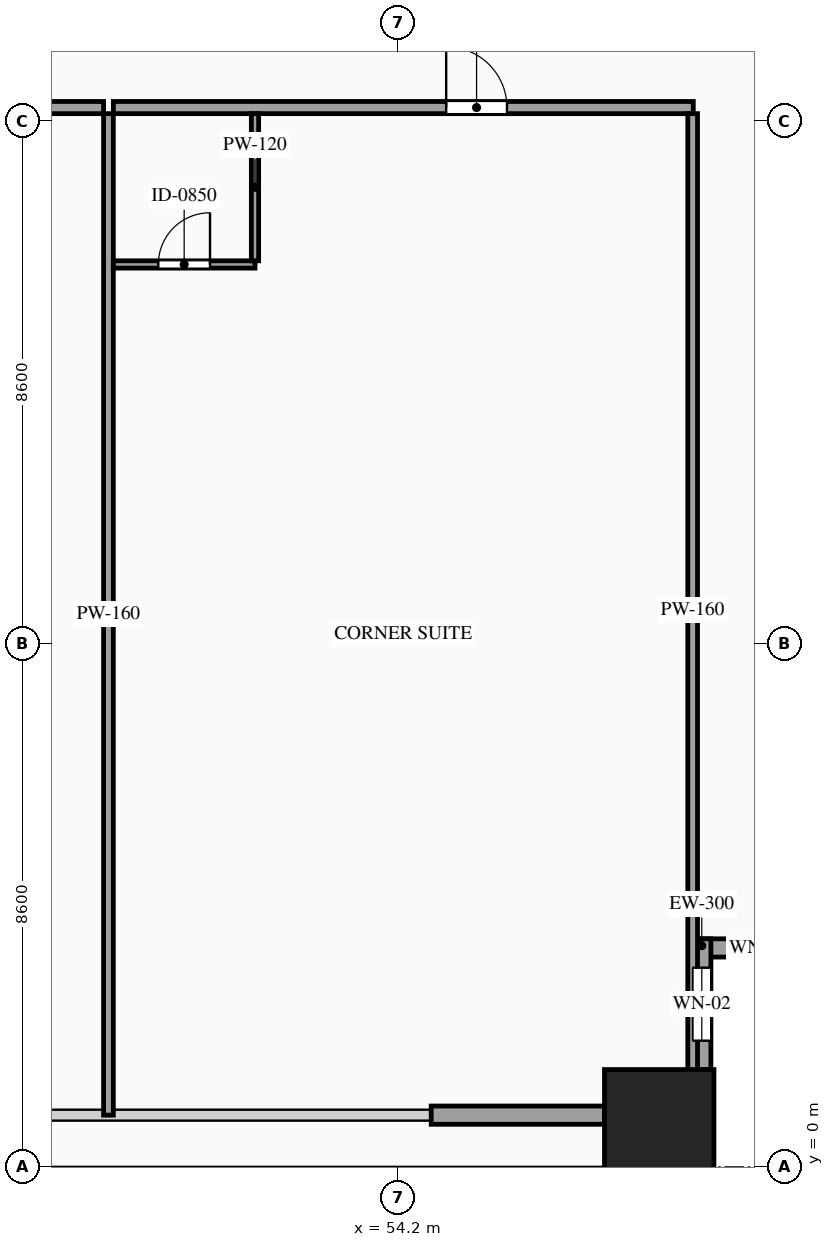
"""IFC4 building model, lengths in metres.
Left out: names, types, materials, properties, quantities, classifications, styles, units other than length and angle.
Written with IfcOpenShell. Run it as: python <this file> out.ifc"""

import sys

from ifc_helpers import new_model, si_unit, direction, frame, frame_2d, origin, origin_2d, place, context, subcontext, project, spatial, rectangle, hollow_rectangle, extrude, source, transform, mapped, element, fill, save


model = new_model("IFC4")
c1 = context("Model", 3, precision=1e-05, world=origin(), true_north=direction((0.0, 1.0)))
c2 = subcontext(c1, "Body", "Model", "MODEL_VIEW")
j1 = project(units=[si_unit("LENGTHUNIT", "METRE"), si_unit("PLANEANGLEUNIT", "RADIAN")], contexts=[c1])
p1 = place(None, origin())
s1 = spatial("IfcSite", under=j1, at=p1, CompositionType="ELEMENT")
p2 = place(p1, origin())
s2 = spatial("IfcBuilding", under=s1, at=p2, CompositionType="ELEMENT")
p3 = place(p2, frame((0.0, 0.0, 49.6)))
s3 = spatial("IfcBuildingStorey", under=s2, at=p3, CompositionType="ELEMENT", Elevation=49.6)
m1 = source(origin(), c2, "Body", "SweptSolid", [
    extrude(hollow_rectangle(XDim=1.8, YDim=1.8, WallThickness=0.08, at=origin_2d()), origin(), (0.0, 0.0, 1.0), 3.6),
])
p4 = place(p3, frame((58.5, 0.7, 0.0), z_axis=(0.0, 0.0, 1.0), x_axis=(1.0, 0.0, 0.0)))
e1 = element("IfcColumn", 1, at=p4, inside=s3, PredefinedType="COLUMN", context=c2, shape_type="MappedRepresentation", body=[
    mapped(m1, transform((0.0, 0.0, 0.0), scale=1.0)),
])
p5 = place(p3, frame((59.05, 3.6, 0.0), z_axis=(0.0, 0.0, 1.0), x_axis=(1.0, 0.0, 0.0)))
e2 = element("IfcWall", 2, at=p5, inside=s3, PredefinedType="SOLIDWALL", context=c2, shape_type="SweptSolid", body=[
    extrude(rectangle(XDim=2.15, YDim=0.3, at=frame_2d((1.075, 0.0))), origin(), (0.0, 0.0, 1.0), 3.38),
])
p6 = place(p5, frame((0.625, 0.0, 0.85)))
e3 = element("IfcOpeningElement", 3, at=p6, cuts=e2, PredefinedType="OPENING", context=c2, shape_type="SweptSolid", body=[
    extrude(rectangle(XDim=0.9, YDim=1.5, at=frame_2d((0.45, 0.75))), frame((0.0, 0.165, 0.0), z_axis=(0.0, -1.0, 0.0), x_axis=(1.0, 0.0, 0.0)), (0.0, 0.0, 1.0), 0.33),
])
p7 = place(p3, frame((59.2, 1.6, 0.0), z_axis=(0.0, 0.0, 1.0), x_axis=(0.0, 1.0, 0.0)))
e4 = element("IfcWall", 4, at=p7, inside=s3, PredefinedType="SOLIDWALL", context=c2, shape_type="SweptSolid", body=[
    extrude(rectangle(XDim=2.15, YDim=0.3, at=frame_2d((1.075, 0.0))), origin(), (0.0, 0.0, 1.0), 3.38),
])
p8 = place(p7, frame((0.475, 0.0, 0.85)))
e5 = element("IfcOpeningElement", 5, at=p8, cuts=e4, PredefinedType="OPENING", context=c2, shape_type="SweptSolid", body=[
    extrude(rectangle(XDim=1.2, YDim=2.1, at=frame_2d((0.6, 1.05))), frame((0.0, 0.165, 0.0), z_axis=(0.0, -1.0, 0.0), x_axis=(1.0, 0.0, 0.0)), (0.0, 0.0, 1.0), 0.33),
])
m2 = source(origin(), c2, "Body", "SweptSolid", [
    extrude(rectangle(XDim=2.85, YDim=0.3, at=frame_2d((1.425, 0.0))), origin(), (0.0, 0.0, 1.0), 2.775),
])
p9 = place(p3, frame((54.75, 0.85, 0.0), z_axis=(0.0, 0.0, 1.0), x_axis=(1.0, 0.0, 0.0)))
e6 = element("IfcWall", 6, at=p9, inside=s3, PredefinedType="SOLIDWALL", context=c2, shape_type="MappedRepresentation", body=[
    mapped(m2, transform((0.0, 0.0, 0.0), scale=1.0)),
])
p10 = place(p3, frame((42.816, 17.42, 0.0), z_axis=(0.0, 0.0, 1.0), x_axis=(1.0, 0.0, 0.0)))
e7 = element("IfcWall", 7, at=p10, inside=s3, PredefinedType="PARTITIONING", context=c2, shape_type="SweptSolid", body=[
    extrude(rectangle(XDim=6.546, YDim=0.2, at=frame_2d((3.273, 0.0))), origin(), (0.0, 0.0, 1.0), 3.38),
])
p11 = place(p10, frame((2.773, 0.0, 0.0)))
e8 = element("IfcOpeningElement", 8, at=p11, cuts=e7, PredefinedType="OPENING", context=c2, shape_type="SweptSolid", body=[
    extrude(rectangle(XDim=1.0, YDim=2.2, at=frame_2d((0.5, 1.1))), frame((0.0, 0.115, 0.0), z_axis=(0.0, -1.0, 0.0), x_axis=(1.0, 0.0, 0.0)), (0.0, 0.0, 1.0), 0.23),
])
m3 = source(origin(), c2, "Body", "SweptSolid", [
    extrude(rectangle(XDim=16.47, YDim=0.16, at=frame_2d((8.235, 0.0))), origin(), (0.0, 0.0, 1.0), 3.38),
])
p12 = place(p3, frame((49.442, 0.85, 0.0), z_axis=(0.0, 0.0, 1.0), x_axis=(0.0, 1.0, 0.0)))
e9 = element("IfcWall", 9, at=p12, inside=s3, PredefinedType="PARTITIONING", context=c2, shape_type="MappedRepresentation", body=[
    mapped(m3, transform((0.0, 0.0, 0.0), scale=1.0)),
])
p13 = place(p3, frame((49.522, 17.42, 0.0), z_axis=(0.0, 0.0, 1.0), x_axis=(1.0, 0.0, 0.0)))
e10 = element("IfcWall", 10, at=p13, inside=s3, PredefinedType="PARTITIONING", context=c2, shape_type="SweptSolid", body=[
    extrude(rectangle(XDim=9.538, YDim=0.2, at=frame_2d((4.769, 0.0))), origin(), (0.0, 0.0, 1.0), 3.38),
])
p14 = place(p13, frame((5.474, 0.0, 0.0)))
e11 = element("IfcOpeningElement", 11, at=p14, cuts=e10, PredefinedType="OPENING", context=c2, shape_type="SweptSolid", body=[
    extrude(rectangle(XDim=1.0, YDim=2.2, at=frame_2d((0.5, 1.1))), frame((0.0, 0.115, 0.0), z_axis=(0.0, -1.0, 0.0), x_axis=(1.0, 0.0, 0.0)), (0.0, 0.0, 1.0), 0.23),
])
m4 = source(origin(), c2, "Body", "SweptSolid", [
    extrude(rectangle(XDim=16.32, YDim=0.16, at=frame_2d((8.16, 0.0))), origin(), (0.0, 0.0, 1.0), 3.38),
])
p15 = place(p3, frame((59.05, 1.0, 0.0), z_axis=(0.0, 0.0, 1.0), x_axis=(0.0, 1.0, 0.0)))
e12 = element("IfcWall", 12, at=p15, inside=s3, PredefinedType="PARTITIONING", context=c2, shape_type="MappedRepresentation", body=[
    mapped(m4, transform((0.0, 0.0, 0.0), scale=1.0)),
])
p16 = place(p3, frame((49.522, 14.84, 0.0), z_axis=(0.0, 0.0, 1.0), x_axis=(1.0, 0.0, 0.0)))
e13 = element("IfcWall", 13, at=p16, inside=s3, PredefinedType="PARTITIONING", context=c2, shape_type="SweptSolid", body=[
    extrude(rectangle(XDim=2.33, YDim=0.12, at=frame_2d((1.165, 0.0))), origin(), (0.0, 0.0, 1.0), 3.38),
])
p17 = place(p16, frame((0.74, 0.0, 0.0)))
e14 = element("IfcOpeningElement", 14, at=p17, cuts=e13, PredefinedType="OPENING", context=c2, shape_type="SweptSolid", body=[
    extrude(rectangle(XDim=0.85, YDim=2.1, at=frame_2d((0.425, 1.05))), frame((0.0, 0.075, 0.0), z_axis=(0.0, -1.0, 0.0), x_axis=(1.0, 0.0, 0.0)), (0.0, 0.0, 1.0), 0.15),
])
m5 = source(origin(), c2, "Body", "SweptSolid", [
    extrude(rectangle(XDim=2.42, YDim=0.12, at=frame_2d((1.21, 0.0))), origin(), (0.0, 0.0, 1.0), 3.38),
])
p18 = place(p3, frame((51.852, 14.9, 0.0), z_axis=(0.0, 0.0, 1.0), x_axis=(0.0, 1.0, 0.0)))
e15 = element("IfcWall", 15, at=p18, inside=s3, PredefinedType="PARTITIONING", context=c2, shape_type="MappedRepresentation", body=[
    mapped(m5, transform((0.0, 0.0, 0.0), scale=1.0)),
])
m6 = source(origin(), c2, "Body", "SweptSolid", [
    extrude(rectangle(XDim=0.9, YDim=1.5, at=frame_2d((0.45, 0.75))), frame((0.0, 0.03, 0.0), z_axis=(0.0, -1.0, 0.0), x_axis=(1.0, 0.0, 0.0)), (0.0, 0.0, 1.0), 0.06),
])
p19 = place(p6, origin())
e16 = element("IfcWindow", 16, at=p19, inside=s3, PartitioningType="SINGLE_PANEL", PredefinedType="WINDOW", context=c2, shape_type="MappedRepresentation", body=[
    mapped(m6, transform((0.0, 0.0, 0.0), scale=1.0)),
])
fill(e3, e16)
m7 = source(origin(), c2, "Body", "SweptSolid", [
    extrude(rectangle(XDim=1.2, YDim=2.1, at=frame_2d((0.6, 1.05))), frame((0.0, 0.03, 0.0), z_axis=(0.0, -1.0, 0.0), x_axis=(1.0, 0.0, 0.0)), (0.0, 0.0, 1.0), 0.06),
])
p20 = place(p8, origin())
e17 = element("IfcWindow", 17, at=p20, inside=s3, PartitioningType="SINGLE_PANEL", PredefinedType="WINDOW", context=c2, shape_type="MappedRepresentation", body=[
    mapped(m7, transform((0.0, 0.0, 0.0), scale=1.0)),
])
fill(e5, e17)
m8 = source(origin(), c2, "Body", "SweptSolid", [
    extrude(rectangle(XDim=1.0, YDim=2.2, at=frame_2d((0.5, 1.1))), frame((0.0, 0.025, 0.0), z_axis=(0.0, -1.0, 0.0), x_axis=(1.0, 0.0, 0.0)), (0.0, 0.0, 1.0), 0.05),
])
p21 = place(p14, origin())
e18 = element("IfcDoor", 18, at=p21, inside=s3, OperationType="SINGLE_SWING_LEFT", PredefinedType="DOOR", context=c2, shape_type="MappedRepresentation", body=[
    mapped(m8, transform((0.0, 0.0, 0.0), scale=1.0)),
])
fill(e11, e18)
m9 = source(origin(), c2, "Body", "SweptSolid", [
    extrude(rectangle(XDim=0.85, YDim=2.1, at=frame_2d((0.425, 1.05))), frame((0.0, 0.025, 0.0), z_axis=(0.0, -1.0, 0.0), x_axis=(1.0, 0.0, 0.0)), (0.0, 0.0, 1.0), 0.05),
])
p22 = place(p17, origin())
e19 = element("IfcDoor", 19, at=p22, inside=s3, OperationType="SINGLE_SWING_RIGHT", PredefinedType="DOOR", context=c2, shape_type="MappedRepresentation", body=[
    mapped(m9, transform((0.0, 0.0, 0.0), scale=1.0)),
])
fill(e14, e19)
save(model, sys.argv[1])
